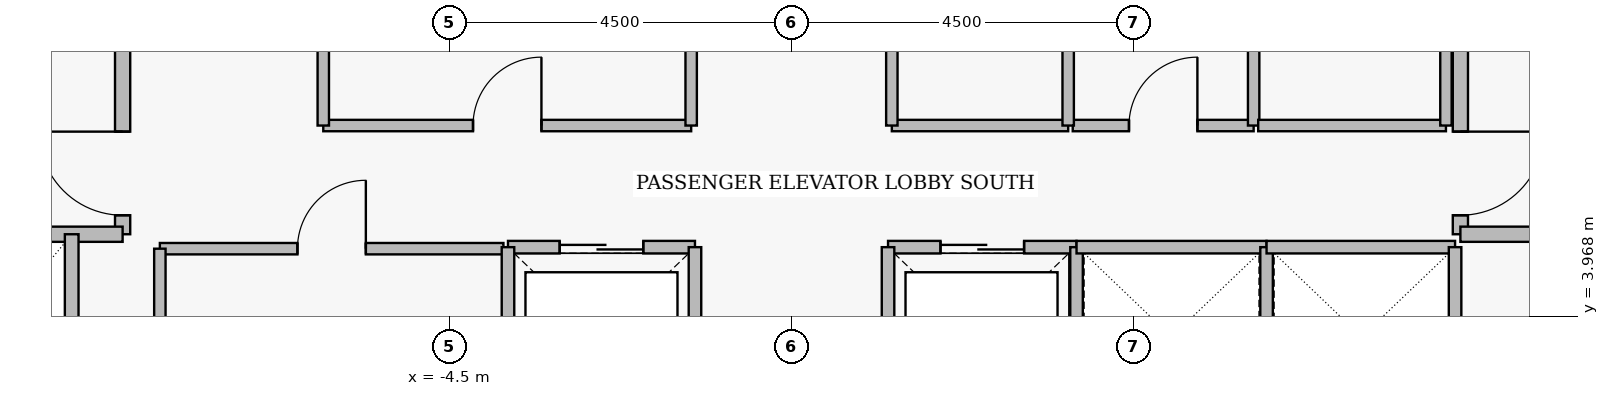
"""IFC4 building model, lengths in metres.
Left out: names, types, materials, properties, quantities, classifications, styles, units other than length and angle.
Written with IfcOpenShell. Run it as: python <this file> out.ifc"""

import sys

from ifc_helpers import new_model, si_unit, direction, frame, frame_2d, origin, place, context, subcontext, project, spatial, rectangle, extrude, element, fill, save


model = new_model("IFC4")
c1 = context("Model", 3, precision=1e-05, world=origin(), true_north=direction((0.0, 1.0)))
c2 = subcontext(c1, "Body", "Model", "MODEL_VIEW")
j1 = project(units=[si_unit("LENGTHUNIT", "METRE"), si_unit("PLANEANGLEUNIT", "RADIAN")], contexts=[c1])
p1 = place(None, origin())
s1 = spatial("IfcSite", under=j1, at=p1, CompositionType="ELEMENT")
p2 = place(p1, origin())
s2 = spatial("IfcBuilding", under=s1, at=p2, CompositionType="ELEMENT")
p3 = place(p2, frame((0.0, 0.0, 222.4)))
s3 = spatial("IfcBuildingStorey", under=s2, at=p3, CompositionType="ELEMENT", Elevation=222.4)
p4 = place(p3, frame((-8.8, 5.05, 0.0), z_axis=(0.0, 0.0, 1.0), x_axis=(0.0, 1.0, 0.0)))
e1 = element("IfcWall", 1, at=p4, inside=s3, PredefinedType="PARTITIONING", context=c2, shape_type="SweptSolid", body=[
    extrude(rectangle(XDim=6.1, YDim=0.2, at=frame_2d((3.05, 0.0))), origin(), (0.0, 0.0, 1.0), 3.53),
])
p5 = place(p4, frame((0.25, 0.0, 0.0)))
e2 = element("IfcOpeningElement", 2, at=p5, cuts=e1, PredefinedType="OPENING", context=c2, shape_type="SweptSolid", body=[
    extrude(rectangle(XDim=1.1, YDim=2.2, at=frame_2d((0.55, 1.1))), frame((0.0, 0.11, 0.0), z_axis=(0.0, -1.0, 0.0), x_axis=(1.0, 0.0, 0.0)), (0.0, 0.0, 1.0), 0.22),
])
p6 = place(p4, frame((3.85, 0.0, 0.0)))
e3 = element("IfcOpeningElement", 3, at=p6, cuts=e1, PredefinedType="OPENING", context=c2, shape_type="SweptSolid", body=[
    extrude(rectangle(XDim=1.1, YDim=2.2, at=frame_2d((0.55, 1.1))), frame((0.0, 0.11, 0.0), z_axis=(0.0, -1.0, 0.0), x_axis=(1.0, 0.0, 0.0)), (0.0, 0.0, 1.0), 0.22),
])
p7 = place(p3, frame((8.8, 11.15, 0.0), z_axis=(0.0, 0.0, 1.0), x_axis=(0.0, -1.0, 0.0)))
e4 = element("IfcWall", 4, at=p7, inside=s3, PredefinedType="PARTITIONING", context=c2, shape_type="SweptSolid", body=[
    extrude(rectangle(XDim=6.1, YDim=0.2, at=frame_2d((3.05, 0.0))), origin(), (0.0, 0.0, 1.0), 3.53),
])
p8 = place(p7, frame((1.15, 0.0, 0.0)))
e5 = element("IfcOpeningElement", 5, at=p8, cuts=e4, PredefinedType="OPENING", context=c2, shape_type="SweptSolid", body=[
    extrude(rectangle(XDim=1.1, YDim=2.2, at=frame_2d((0.55, 1.1))), frame((0.0, 0.11, 0.0), z_axis=(0.0, -1.0, 0.0), x_axis=(1.0, 0.0, 0.0)), (0.0, 0.0, 1.0), 0.22),
])
p9 = place(p7, frame((4.75, 0.0, 0.0)))
e6 = element("IfcOpeningElement", 6, at=p9, cuts=e4, PredefinedType="OPENING", context=c2, shape_type="SweptSolid", body=[
    extrude(rectangle(XDim=1.1, YDim=2.2, at=frame_2d((0.55, 1.1))), frame((0.0, 0.11, 0.0), z_axis=(0.0, -1.0, 0.0), x_axis=(1.0, 0.0, 0.0)), (0.0, 0.0, 1.0), 0.22),
])
p10 = place(p3, frame((-3.73, 4.88, 0.0), z_axis=(0.0, 0.0, 1.0), x_axis=(1.0, 0.0, 0.0)))
e7 = element("IfcWall", 7, at=p10, inside=s3, PredefinedType="PARTITIONING", context=c2, shape_type="SweptSolid", body=[
    extrude(rectangle(XDim=2.46, YDim=0.165, at=frame_2d((1.23, 0.0))), origin(), (0.0, 0.0, 1.0), 3.53),
])
p11 = place(p10, frame((0.68, 0.0, 0.0)))
e8 = element("IfcOpeningElement", 8, at=p11, cuts=e7, PredefinedType="OPENING", context=c2, shape_type="SweptSolid", body=[
    extrude(rectangle(XDim=1.1, YDim=2.25, at=frame_2d((0.55, 1.125))), frame((0.0, 0.093, 0.0), z_axis=(0.0, -1.0, 0.0), x_axis=(1.0, 0.0, 0.0)), (0.0, 0.0, 1.0), 0.185),
])
p12 = place(p3, frame((1.27, 4.88, 0.0), z_axis=(0.0, 0.0, 1.0), x_axis=(1.0, 0.0, 0.0)))
e9 = element("IfcWall", 9, at=p12, inside=s3, PredefinedType="PARTITIONING", context=c2, shape_type="SweptSolid", body=[
    extrude(rectangle(XDim=2.48, YDim=0.165, at=frame_2d((1.24, 0.0))), origin(), (0.0, 0.0, 1.0), 3.53),
])
p13 = place(p12, frame((0.69, 0.0, 0.0)))
e10 = element("IfcOpeningElement", 10, at=p13, cuts=e9, PredefinedType="OPENING", context=c2, shape_type="SweptSolid", body=[
    extrude(rectangle(XDim=1.1, YDim=2.25, at=frame_2d((0.55, 1.125))), frame((0.0, 0.093, 0.0), z_axis=(0.0, -1.0, 0.0), x_axis=(1.0, 0.0, 0.0)), (0.0, 0.0, 1.0), 0.185),
])
p14 = place(p3, frame((-8.31, 4.86, 0.0), z_axis=(0.0, 0.0, 1.0), x_axis=(1.0, 0.0, 0.0)))
e11 = element("IfcWall", 11, at=p14, inside=s3, PredefinedType="PARTITIONING", context=c2, shape_type="SweptSolid", body=[
    extrude(rectangle(XDim=4.52, YDim=0.15, at=frame_2d((2.26, 0.0))), origin(), (0.0, 0.0, 1.0), 3.53),
])
p15 = place(p14, frame((1.81, 0.0, 0.0)))
e12 = element("IfcOpeningElement", 12, at=p15, cuts=e11, PredefinedType="OPENING", context=c2, shape_type="SweptSolid", body=[
    extrude(rectangle(XDim=0.9, YDim=2.15, at=frame_2d((0.45, 1.075))), frame((0.0, 0.085, 0.0), z_axis=(0.0, -1.0, 0.0), x_axis=(1.0, 0.0, 0.0)), (0.0, 0.0, 1.0), 0.17),
])
p16 = place(p3, frame((-6.16, 6.48, 0.0), z_axis=(0.0, 0.0, 1.0), x_axis=(1.0, 0.0, 0.0)))
e13 = element("IfcWall", 13, at=p16, inside=s3, PredefinedType="PARTITIONING", context=c2, shape_type="SweptSolid", body=[
    extrude(rectangle(XDim=4.84, YDim=0.15, at=frame_2d((2.42, 0.0))), origin(), (0.0, 0.0, 1.0), 3.53),
])
p17 = place(p16, frame((1.97, 0.0, 0.0)))
e14 = element("IfcOpeningElement", 14, at=p17, cuts=e13, PredefinedType="OPENING", context=c2, shape_type="SweptSolid", body=[
    extrude(rectangle(XDim=0.9, YDim=2.15, at=frame_2d((0.45, 1.075))), frame((0.0, 0.085, 0.0), z_axis=(0.0, -1.0, 0.0), x_axis=(1.0, 0.0, 0.0)), (0.0, 0.0, 1.0), 0.17),
])
p18 = place(p3, frame((3.7, 6.48, 0.0), z_axis=(0.0, 0.0, 1.0), x_axis=(1.0, 0.0, 0.0)))
e15 = element("IfcWall", 15, at=p18, inside=s3, PredefinedType="PARTITIONING", context=c2, shape_type="SweptSolid", body=[
    extrude(rectangle(XDim=2.38, YDim=0.15, at=frame_2d((1.19, 0.0))), origin(), (0.0, 0.0, 1.0), 3.53),
])
p19 = place(p18, frame((0.74, 0.0, 0.0)))
e16 = element("IfcOpeningElement", 16, at=p19, cuts=e15, PredefinedType="OPENING", context=c2, shape_type="SweptSolid", body=[
    extrude(rectangle(XDim=0.9, YDim=2.15, at=frame_2d((0.45, 1.075))), frame((0.0, 0.085, 0.0), z_axis=(0.0, -1.0, 0.0), x_axis=(1.0, 0.0, 0.0)), (0.0, 0.0, 1.0), 0.17),
])
for number, where, z_axis, x_axis in (
    (17, (-11.65, 5.05, 0.0), (0.0, 0.0, 1.0), (1.0, 0.0, 0.0)),
    (18, (8.8, 5.05, 0.0), (0.0, 0.0, 1.0), (1.0, 0.0, 0.0)),
):
    element("IfcWall", number, at=place(p3, frame(where, z_axis=z_axis, x_axis=x_axis)), inside=s3, PredefinedType="PARTITIONING", context=c2, shape_type="SweptSolid", body=[
        extrude(rectangle(XDim=2.85, YDim=0.2, at=frame_2d((1.425, 0.0))), origin(), (0.0, 0.0, 1.0), 3.53),
    ])
for number, where, z_axis, x_axis in (
    (19, (-3.73, 2.52, 0.0), (0.0, 0.0, 1.0), (0.0, 1.0, 0.0)),
    (20, (-1.27, 2.52, 0.0), (0.0, 0.0, 1.0), (0.0, 1.0, 0.0)),
    (21, (1.27, 2.52, 0.0), (0.0, 0.0, 1.0), (0.0, 1.0, 0.0)),
    (22, (3.75, 2.52, 0.0), (0.0, 0.0, 1.0), (0.0, 1.0, 0.0)),
):
    element("IfcWall", number, at=place(p3, frame(where, z_axis=z_axis, x_axis=x_axis)), inside=s3, PredefinedType="PARTITIONING", context=c2, shape_type="SweptSolid", body=[
        extrude(rectangle(XDim=2.36, YDim=0.165, at=frame_2d((1.18, 0.0))), origin(), (0.0, 0.0, 1.0), 3.53),
    ])
p20 = place(p3, frame((3.75, 4.88, 0.0), z_axis=(0.0, 0.0, 1.0), x_axis=(1.0, 0.0, 0.0)))
e23 = element("IfcWall", 23, at=p20, inside=s3, PredefinedType="PARTITIONING", context=c2, shape_type="SweptSolid", body=[
    extrude(rectangle(XDim=2.5, YDim=0.165, at=frame_2d((1.25, 0.0))), origin(), (0.0, 0.0, 1.0), 3.53),
])
p21 = place(p3, frame((6.25, 2.52, 0.0), z_axis=(0.0, 0.0, 1.0), x_axis=(0.0, 1.0, 0.0)))
e24 = element("IfcWall", 24, at=p21, inside=s3, PredefinedType="PARTITIONING", context=c2, shape_type="SweptSolid", body=[
    extrude(rectangle(XDim=2.36, YDim=0.165, at=frame_2d((1.18, 0.0))), origin(), (0.0, 0.0, 1.0), 3.53),
])
p22 = place(p3, frame((6.25, 4.88, 0.0), z_axis=(0.0, 0.0, 1.0), x_axis=(1.0, 0.0, 0.0)))
e25 = element("IfcWall", 25, at=p22, inside=s3, PredefinedType="PARTITIONING", context=c2, shape_type="SweptSolid", body=[
    extrude(rectangle(XDim=2.48, YDim=0.165, at=frame_2d((1.24, 0.0))), origin(), (0.0, 0.0, 1.0), 3.53),
])
p23 = place(p3, frame((8.73, 2.52, 0.0), z_axis=(0.0, 0.0, 1.0), x_axis=(0.0, 1.0, 0.0)))
e26 = element("IfcWall", 26, at=p23, inside=s3, PredefinedType="PARTITIONING", context=c2, shape_type="SweptSolid", body=[
    extrude(rectangle(XDim=2.36, YDim=0.165, at=frame_2d((1.18, 0.0))), origin(), (0.0, 0.0, 1.0), 3.53),
])
p24 = place(p3, frame((-8.31, 2.49, 0.0), z_axis=(0.0, 0.0, 1.0), x_axis=(0.0, 1.0, 0.0)))
e27 = element("IfcWall", 27, at=p24, inside=s3, PredefinedType="PARTITIONING", context=c2, shape_type="SweptSolid", body=[
    extrude(rectangle(XDim=2.37, YDim=0.15, at=frame_2d((1.185, 0.0))), origin(), (0.0, 0.0, 1.0), 3.53),
])
p25 = place(p3, frame((-9.47, 2.45, 0.0), z_axis=(0.0, 0.0, 1.0), x_axis=(0.0, 1.0, 0.0)))
e28 = element("IfcWall", 28, at=p25, inside=s3, PredefinedType="PARTITIONING", context=c2, shape_type="SweptSolid", body=[
    extrude(rectangle(XDim=2.6, YDim=0.18, at=frame_2d((1.3, 0.0))), origin(), (0.0, 0.0, 1.0), 3.53),
])
for number, where, z_axis, x_axis in (
    (29, (-6.16, 6.48, 0.0), (0.0, 0.0, 1.0), (0.0, 1.0, 0.0)),
    (30, (-1.32, 6.48, 0.0), (0.0, 0.0, 1.0), (0.0, 1.0, 0.0)),
):
    element("IfcWall", number, at=place(p3, frame(where, z_axis=z_axis, x_axis=x_axis)), inside=s3, PredefinedType="PARTITIONING", context=c2, shape_type="SweptSolid", body=[
        extrude(rectangle(XDim=2.24, YDim=0.15, at=frame_2d((1.12, 0.0))), origin(), (0.0, 0.0, 1.0), 3.53),
    ])
p26 = place(p3, frame((1.32, 6.48, 0.0), z_axis=(0.0, 0.0, 1.0), x_axis=(1.0, 0.0, 0.0)))
e31 = element("IfcWall", 31, at=p26, inside=s3, PredefinedType="PARTITIONING", context=c2, shape_type="SweptSolid", body=[
    extrude(rectangle(XDim=2.32, YDim=0.15, at=frame_2d((1.16, 0.0))), origin(), (0.0, 0.0, 1.0), 3.53),
])
for number, where, z_axis, x_axis in (
    (32, (1.32, 6.48, 0.0), (0.0, 0.0, 1.0), (0.0, 1.0, 0.0)),
    (33, (3.64, 6.48, 0.0), (0.0, 0.0, 1.0), (0.0, 1.0, 0.0)),
    (34, (6.08, 6.48, 0.0), (0.0, 0.0, 1.0), (0.0, 1.0, 0.0)),
):
    element("IfcWall", number, at=place(p3, frame(where, z_axis=z_axis, x_axis=x_axis)), inside=s3, PredefinedType="PARTITIONING", context=c2, shape_type="SweptSolid", body=[
        extrude(rectangle(XDim=2.24, YDim=0.15, at=frame_2d((1.12, 0.0))), origin(), (0.0, 0.0, 1.0), 3.53),
    ])
p27 = place(p3, frame((6.14, 6.48, 0.0), z_axis=(0.0, 0.0, 1.0), x_axis=(1.0, 0.0, 0.0)))
e35 = element("IfcWall", 35, at=p27, inside=s3, PredefinedType="PARTITIONING", context=c2, shape_type="SweptSolid", body=[
    extrude(rectangle(XDim=2.47, YDim=0.15, at=frame_2d((1.235, 0.0))), origin(), (0.0, 0.0, 1.0), 3.53),
])
p28 = place(p3, frame((8.61, 6.48, 0.0), z_axis=(0.0, 0.0, 1.0), x_axis=(0.0, 1.0, 0.0)))
e36 = element("IfcWall", 36, at=p28, inside=s3, PredefinedType="PARTITIONING", context=c2, shape_type="SweptSolid", body=[
    extrude(rectangle(XDim=2.24, YDim=0.15, at=frame_2d((1.12, 0.0))), origin(), (0.0, 0.0, 1.0), 3.53),
])
p29 = place(p5, origin())
e37 = element("IfcDoor", 37, at=p29, inside=s3, OperationType="SINGLE_SWING_RIGHT", PredefinedType="DOOR", context=c2, shape_type="SweptSolid", body=[
    extrude(rectangle(XDim=1.1, YDim=2.2, at=frame_2d((0.55, 1.1))), frame((0.0, 0.025, 0.0), z_axis=(0.0, -1.0, 0.0), x_axis=(1.0, 0.0, 0.0)), (0.0, 0.0, 1.0), 0.05),
])
fill(e2, e37)
p30 = place(p9, origin())
e38 = element("IfcDoor", 38, at=p30, inside=s3, OperationType="SINGLE_SWING_LEFT", PredefinedType="DOOR", context=c2, shape_type="SweptSolid", body=[
    extrude(rectangle(XDim=1.1, YDim=2.2, at=frame_2d((0.55, 1.1))), frame((0.0, 0.025, 0.0), z_axis=(0.0, -1.0, 0.0), x_axis=(1.0, 0.0, 0.0)), (0.0, 0.0, 1.0), 0.05),
])
fill(e6, e38)
p31 = place(p11, origin())
e39 = element("IfcDoor", 39, at=p31, inside=s3, OperationType="SLIDING_TO_LEFT", PredefinedType="DOOR", context=c2, shape_type="SweptSolid", body=[
    extrude(rectangle(XDim=1.1, YDim=2.25, at=frame_2d((0.55, 1.125))), frame((0.0, 0.025, 0.0), z_axis=(0.0, -1.0, 0.0), x_axis=(1.0, 0.0, 0.0)), (0.0, 0.0, 1.0), 0.05),
])
fill(e8, e39)
p32 = place(p13, origin())
e40 = element("IfcDoor", 40, at=p32, inside=s3, OperationType="SLIDING_TO_LEFT", PredefinedType="DOOR", context=c2, shape_type="SweptSolid", body=[
    extrude(rectangle(XDim=1.1, YDim=2.25, at=frame_2d((0.55, 1.125))), frame((0.0, 0.025, 0.0), z_axis=(0.0, -1.0, 0.0), x_axis=(1.0, 0.0, 0.0)), (0.0, 0.0, 1.0), 0.05),
])
fill(e10, e40)
p33 = place(p15, origin())
e41 = element("IfcDoor", 41, at=p33, inside=s3, OperationType="SINGLE_SWING_RIGHT", PredefinedType="DOOR", context=c2, shape_type="SweptSolid", body=[
    extrude(rectangle(XDim=0.9, YDim=2.15, at=frame_2d((0.45, 1.075))), frame((0.0, 0.025, 0.0), z_axis=(0.0, -1.0, 0.0), x_axis=(1.0, 0.0, 0.0)), (0.0, 0.0, 1.0), 0.05),
])
fill(e12, e41)
p34 = place(p17, origin())
e42 = element("IfcDoor", 42, at=p34, inside=s3, OperationType="SINGLE_SWING_RIGHT", PredefinedType="DOOR", context=c2, shape_type="SweptSolid", body=[
    extrude(rectangle(XDim=0.9, YDim=2.15, at=frame_2d((0.45, 1.075))), frame((0.0, 0.025, 0.0), z_axis=(0.0, -1.0, 0.0), x_axis=(1.0, 0.0, 0.0)), (0.0, 0.0, 1.0), 0.05),
])
fill(e14, e42)
p35 = place(p19, origin())
e43 = element("IfcDoor", 43, at=p35, inside=s3, OperationType="SINGLE_SWING_RIGHT", PredefinedType="DOOR", context=c2, shape_type="SweptSolid", body=[
    extrude(rectangle(XDim=0.9, YDim=2.15, at=frame_2d((0.45, 1.075))), frame((0.0, 0.025, 0.0), z_axis=(0.0, -1.0, 0.0), x_axis=(1.0, 0.0, 0.0)), (0.0, 0.0, 1.0), 0.05),
])
fill(e16, e43)
save(model, sys.argv[1])
